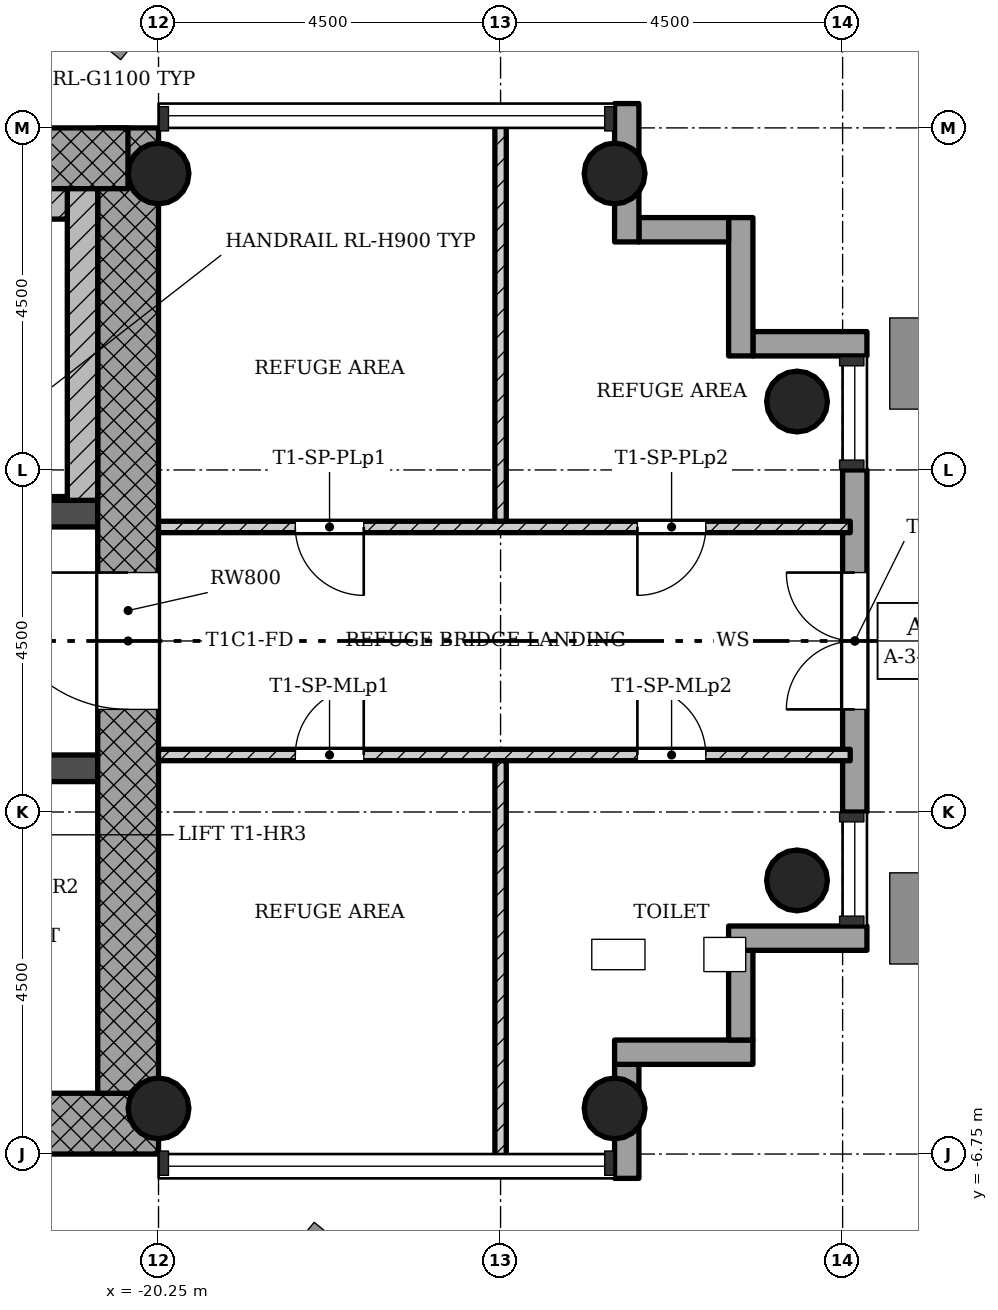
"""IFC4 building model, lengths in metres.
Left out: names, types, materials, properties, quantities, classifications, styles, units other than length and angle.
Written with IfcOpenShell. Run it as: python <this file> out.ifc"""

import sys

from ifc_helpers import new_model, si_unit, direction, frame, frame_2d, origin, origin_2d, place, context, subcontext, project, spatial, rectangle, hollow_circle, extrude, element, fill, save


model = new_model("IFC4")
c1 = context("Model", 3, precision=1e-05, world=origin(), true_north=direction((0.0, 1.0)))
c2 = subcontext(c1, "Body", "Model", "MODEL_VIEW")
j1 = project(units=[si_unit("LENGTHUNIT", "METRE"), si_unit("PLANEANGLEUNIT", "RADIAN")], contexts=[c1])
p1 = place(None, origin())
s1 = spatial("IfcSite", under=j1, at=p1, CompositionType="ELEMENT")
p2 = place(p1, origin())
s2 = spatial("IfcBuilding", under=s1, at=p2, CompositionType="ELEMENT")
p3 = place(p2, frame((0.0, 0.0, 181.3)))
s3 = spatial("IfcBuildingStorey", under=s2, at=p3, CompositionType="ELEMENT", Elevation=181.3)
p4 = place(p3, frame((-28.45, -6.35, 0.0), z_axis=(0.0, 0.0, 1.0), x_axis=(1.0, 0.0, 0.0)))
e1 = element("IfcWall", 1, at=p4, inside=s3, PredefinedType="SHEAR", context=c2, shape_type="SweptSolid", body=[
    extrude(rectangle(XDim=8.2, YDim=0.8, at=frame_2d((4.1, 0.0))), origin(), (0.0, 0.0, 1.0), 4.5),
])
p5 = place(p3, frame((-20.65, -5.95, 0.0), z_axis=(0.0, 0.0, 1.0), x_axis=(0.0, 1.0, 0.0)))
e2 = element("IfcWall", 2, at=p5, inside=s3, PredefinedType="SHEAR", context=c2, shape_type="SweptSolid", body=[
    extrude(rectangle(XDim=12.7, YDim=0.8, at=frame_2d((6.35, 0.0))), origin(), (0.0, 0.0, 1.0), 4.5),
])
p6 = place(p5, frame((5.05, 0.0, 0.0)))
e3 = element("IfcOpeningElement", 3, at=p6, cuts=e2, PredefinedType="OPENING", context=c2, shape_type="SweptSolid", body=[
    extrude(rectangle(XDim=1.8, YDim=2.1, at=frame_2d((0.9, 1.05))), frame((0.0, 0.41, 0.0), z_axis=(0.0, -1.0, 0.0), x_axis=(1.0, 0.0, 0.0)), (0.0, 0.0, 1.0), 0.82),
])
p7 = place(p3, frame((-20.652, 6.35, 0.0), z_axis=(0.0, 0.0, 1.0), x_axis=(-1.0, 0.0, 0.0)))
e4 = element("IfcWall", 4, at=p7, inside=s3, PredefinedType="SHEAR", context=c2, shape_type="SweptSolid", body=[
    extrude(rectangle(XDim=8.796, YDim=0.8, at=frame_2d((4.398, 0.0))), origin(), (0.0, 0.0, 1.0), 4.5),
])
p8 = place(p3, frame((-28.45, -1.675, 0.0), z_axis=(0.0, 0.0, 1.0), x_axis=(1.0, 0.0, 0.0)))
e5 = element("IfcWall", 5, at=p8, inside=s3, PredefinedType="SHEAR", context=c2, shape_type="SweptSolid", body=[
    extrude(rectangle(XDim=7.4, YDim=0.35, at=frame_2d((3.7, 0.0))), origin(), (0.0, 0.0, 1.0), 4.5),
])
p9 = place(p8, frame((0.95, 0.0, 0.0)))
e6 = element("IfcOpeningElement", 6, at=p9, cuts=e5, PredefinedType="OPENING", context=c2, shape_type="SweptSolid", body=[
    extrude(rectangle(XDim=1.1, YDim=2.1, at=frame_2d((0.55, 1.05))), frame((0.0, 0.185, 0.0), z_axis=(0.0, -1.0, 0.0), x_axis=(1.0, 0.0, 0.0)), (0.0, 0.0, 1.0), 0.37),
])
p10 = place(p8, frame((3.15, 0.0, 0.0)))
e7 = element("IfcOpeningElement", 7, at=p10, cuts=e5, PredefinedType="OPENING", context=c2, shape_type="SweptSolid", body=[
    extrude(rectangle(XDim=1.1, YDim=2.1, at=frame_2d((0.55, 1.05))), frame((0.0, 0.185, 0.0), z_axis=(0.0, -1.0, 0.0), x_axis=(1.0, 0.0, 0.0)), (0.0, 0.0, 1.0), 0.37),
])
p11 = place(p8, frame((5.35, 0.0, 0.0)))
e8 = element("IfcOpeningElement", 8, at=p11, cuts=e5, PredefinedType="OPENING", context=c2, shape_type="SweptSolid", body=[
    extrude(rectangle(XDim=1.1, YDim=2.1, at=frame_2d((0.55, 1.05))), frame((0.0, 0.185, 0.0), z_axis=(0.0, -1.0, 0.0), x_axis=(1.0, 0.0, 0.0)), (0.0, 0.0, 1.0), 0.37),
])
p12 = place(p3, frame((-28.45, 1.675, 0.0), z_axis=(0.0, 0.0, 1.0), x_axis=(1.0, 0.0, 0.0)))
e9 = element("IfcWall", 9, at=p12, inside=s3, PredefinedType="SHEAR", context=c2, shape_type="SweptSolid", body=[
    extrude(rectangle(XDim=7.4, YDim=0.35, at=frame_2d((3.7, 0.0))), origin(), (0.0, 0.0, 1.0), 4.5),
])
p13 = place(p12, frame((0.85, 0.0, 0.0)))
e10 = element("IfcOpeningElement", 10, at=p13, cuts=e9, PredefinedType="OPENING", context=c2, shape_type="SweptSolid", body=[
    extrude(rectangle(XDim=0.9, YDim=2.1, at=frame_2d((0.45, 1.05))), frame((0.0, 0.185, 0.0), z_axis=(0.0, -1.0, 0.0), x_axis=(1.0, 0.0, 0.0)), (0.0, 0.0, 1.0), 0.37),
])
for number, where, z_axis, x_axis in (
    (11, (-20.25, -6.15, 0.0), (0.0, 0.0, 1.0), (1.0, 0.0, 0.0)),
    (12, (-20.25, 6.15, 0.0), (0.0, 0.0, 1.0), (1.0, 0.0, 0.0)),
    (13, (-14.25, -6.15, 0.0), (0.0, 0.0, 1.0), (1.0, 0.0, 0.0)),
    (14, (-14.25, 6.15, 0.0), (0.0, 0.0, 1.0), (1.0, 0.0, 0.0)),
    (15, (-11.85, -3.15, 0.0), (0.0, 0.0, 1.0), (1.0, 0.0, 0.0)),
    (16, (-11.85, 3.15, 0.0), (0.0, 0.0, 1.0), (1.0, 0.0, 0.0)),
):
    element("IfcColumn", number, at=place(p3, frame(where, z_axis=z_axis, x_axis=x_axis)), inside=s3, PredefinedType="COLUMN", context=c2, shape_type="SweptSolid", body=[
        extrude(hollow_circle(Radius=0.4, WallThickness=0.028, at=origin_2d()), origin(), (0.0, 0.0, 1.0), 4.5),
    ])
p14 = place(p3, frame((-14.09, -7.07, -0.3), z_axis=(0.0, 0.0, 1.0), x_axis=(0.0, 1.0, 0.0)))
e17 = element("IfcWall", 17, at=p14, inside=s3, PredefinedType="STANDARD", context=c2, shape_type="SweptSolid", body=[
    extrude(rectangle(XDim=1.5, YDim=0.32, at=frame_2d((0.75, 0.0))), origin(), (0.0, 0.0, 1.0), 4.5),
])
p15 = place(p3, frame((-14.25, -5.41, -0.3), z_axis=(0.0, 0.0, 1.0), x_axis=(1.0, 0.0, 0.0)))
e18 = element("IfcWall", 18, at=p15, inside=s3, PredefinedType="STANDARD", context=c2, shape_type="SweptSolid", body=[
    extrude(rectangle(XDim=1.82, YDim=0.32, at=frame_2d((0.91, 0.0))), origin(), (0.0, 0.0, 1.0), 4.5),
])
p16 = place(p3, frame((-12.59, -5.25, -0.3), z_axis=(0.0, 0.0, 1.0), x_axis=(0.0, 1.0, 0.0)))
e19 = element("IfcWall", 19, at=p16, inside=s3, PredefinedType="STANDARD", context=c2, shape_type="SweptSolid", body=[
    extrude(rectangle(XDim=1.18, YDim=0.32, at=frame_2d((0.59, 0.0))), origin(), (0.0, 0.0, 1.0), 4.5),
])
p17 = place(p3, frame((-12.75, -3.91, -0.3), z_axis=(0.0, 0.0, 1.0), x_axis=(1.0, 0.0, 0.0)))
e20 = element("IfcWall", 20, at=p17, inside=s3, PredefinedType="STANDARD", context=c2, shape_type="SweptSolid", body=[
    extrude(rectangle(XDim=1.82, YDim=0.32, at=frame_2d((0.91, 0.0))), origin(), (0.0, 0.0, 1.0), 4.5),
])
p18 = place(p3, frame((-11.09, -2.25, -0.12), z_axis=(0.0, 0.0, 1.0), x_axis=(0.0, 1.0, 0.0)))
e21 = element("IfcWall", 21, at=p18, inside=s3, PredefinedType="STANDARD", context=c2, shape_type="SweptSolid", body=[
    extrude(rectangle(XDim=4.5, YDim=0.32, at=frame_2d((2.25, 0.0))), origin(), (0.0, 0.0, 1.0), 4.32),
])
p19 = place(p18, frame((1.35, 0.0, 0.0)))
e22 = element("IfcOpeningElement", 22, at=p19, cuts=e21, PredefinedType="OPENING", context=c2, shape_type="SweptSolid", body=[
    extrude(rectangle(XDim=1.8, YDim=2.1, at=frame_2d((0.9, 1.05))), frame((0.0, 0.17, 0.0), z_axis=(0.0, -1.0, 0.0), x_axis=(1.0, 0.0, 0.0)), (0.0, 0.0, 1.0), 0.34),
])
p20 = place(p3, frame((-10.93, 3.91, -0.3), z_axis=(0.0, 0.0, 1.0), x_axis=(-1.0, 0.0, 0.0)))
e23 = element("IfcWall", 23, at=p20, inside=s3, PredefinedType="STANDARD", context=c2, shape_type="SweptSolid", body=[
    extrude(rectangle(XDim=1.5, YDim=0.32, at=frame_2d((0.75, 0.0))), origin(), (0.0, 0.0, 1.0), 4.5),
])
p21 = place(p3, frame((-12.59, 3.75, -0.3), z_axis=(0.0, 0.0, 1.0), x_axis=(0.0, 1.0, 0.0)))
e24 = element("IfcWall", 24, at=p21, inside=s3, PredefinedType="STANDARD", context=c2, shape_type="SweptSolid", body=[
    extrude(rectangle(XDim=1.82, YDim=0.32, at=frame_2d((0.91, 0.0))), origin(), (0.0, 0.0, 1.0), 4.5),
])
p22 = place(p3, frame((-12.75, 5.41, -0.3), z_axis=(0.0, 0.0, 1.0), x_axis=(-1.0, 0.0, 0.0)))
e25 = element("IfcWall", 25, at=p22, inside=s3, PredefinedType="STANDARD", context=c2, shape_type="SweptSolid", body=[
    extrude(rectangle(XDim=1.18, YDim=0.32, at=frame_2d((0.59, 0.0))), origin(), (0.0, 0.0, 1.0), 4.5),
])
p23 = place(p3, frame((-14.09, 5.25, -0.3), z_axis=(0.0, 0.0, 1.0), x_axis=(0.0, 1.0, 0.0)))
e26 = element("IfcWall", 26, at=p23, inside=s3, PredefinedType="STANDARD", context=c2, shape_type="SweptSolid", body=[
    extrude(rectangle(XDim=1.82, YDim=0.32, at=frame_2d((0.91, 0.0))), origin(), (0.0, 0.0, 1.0), 4.5),
])
p24 = place(p3, frame((-20.25, 1.5, 0.0), z_axis=(0.0, 0.0, 1.0), x_axis=(1.0, 0.0, 0.0)))
e27 = element("IfcWall", 27, at=p24, inside=s3, PredefinedType="PARTITIONING", context=c2, shape_type="SweptSolid", body=[
    extrude(rectangle(XDim=9.1, YDim=0.15, at=frame_2d((4.55, 0.0))), origin(), (0.0, 0.0, 1.0), 4.08),
])
p25 = place(p24, frame((1.8, 0.0, 0.0)))
e28 = element("IfcOpeningElement", 28, at=p25, cuts=e27, PredefinedType="OPENING", context=c2, shape_type="SweptSolid", body=[
    extrude(rectangle(XDim=0.9, YDim=2.1, at=frame_2d((0.45, 1.05))), frame((0.0, 0.085, 0.0), z_axis=(0.0, -1.0, 0.0), x_axis=(1.0, 0.0, 0.0)), (0.0, 0.0, 1.0), 0.17),
])
p26 = place(p24, frame((6.3, 0.0, 0.0)))
e29 = element("IfcOpeningElement", 29, at=p26, cuts=e27, PredefinedType="OPENING", context=c2, shape_type="SweptSolid", body=[
    extrude(rectangle(XDim=0.9, YDim=2.1, at=frame_2d((0.45, 1.05))), frame((0.0, 0.085, 0.0), z_axis=(0.0, -1.0, 0.0), x_axis=(1.0, 0.0, 0.0)), (0.0, 0.0, 1.0), 0.17),
])
p27 = place(p3, frame((-15.75, 1.575, 0.0), z_axis=(0.0, 0.0, 1.0), x_axis=(0.0, 1.0, 0.0)))
e30 = element("IfcWall", 30, at=p27, inside=s3, PredefinedType="PARTITIONING", context=c2, shape_type="SweptSolid", body=[
    extrude(rectangle(XDim=5.275, YDim=0.15, at=frame_2d((2.638, 0.0))), origin(), (0.0, 0.0, 1.0), 4.08),
])
p28 = place(p3, frame((-20.25, -1.5, 0.0), z_axis=(0.0, 0.0, 1.0), x_axis=(1.0, 0.0, 0.0)))
e31 = element("IfcWall", 31, at=p28, inside=s3, PredefinedType="PARTITIONING", context=c2, shape_type="SweptSolid", body=[
    extrude(rectangle(XDim=9.1, YDim=0.15, at=frame_2d((4.55, 0.0))), origin(), (0.0, 0.0, 1.0), 4.08),
])
p29 = place(p28, frame((1.8, 0.0, 0.0)))
e32 = element("IfcOpeningElement", 32, at=p29, cuts=e31, PredefinedType="OPENING", context=c2, shape_type="SweptSolid", body=[
    extrude(rectangle(XDim=0.9, YDim=2.1, at=frame_2d((0.45, 1.05))), frame((0.0, 0.085, 0.0), z_axis=(0.0, -1.0, 0.0), x_axis=(1.0, 0.0, 0.0)), (0.0, 0.0, 1.0), 0.17),
])
p30 = place(p28, frame((6.3, 0.0, 0.0)))
e33 = element("IfcOpeningElement", 33, at=p30, cuts=e31, PredefinedType="OPENING", context=c2, shape_type="SweptSolid", body=[
    extrude(rectangle(XDim=0.9, YDim=2.1, at=frame_2d((0.45, 1.05))), frame((0.0, 0.085, 0.0), z_axis=(0.0, -1.0, 0.0), x_axis=(1.0, 0.0, 0.0)), (0.0, 0.0, 1.0), 0.17),
])
p31 = place(p3, frame((-15.75, -1.575, 0.0), z_axis=(0.0, 0.0, 1.0), x_axis=(0.0, -1.0, 0.0)))
e34 = element("IfcWall", 34, at=p31, inside=s3, PredefinedType="PARTITIONING", context=c2, shape_type="SweptSolid", body=[
    extrude(rectangle(XDim=5.275, YDim=0.15, at=frame_2d((2.638, 0.0))), origin(), (0.0, 0.0, 1.0), 4.08),
])
p32 = place(p3, frame((-21.25, 1.85, 0.0), z_axis=(0.0, 0.0, 1.0), x_axis=(0.0, 1.0, 0.0)))
e35 = element("IfcWall", 35, at=p32, inside=s3, PredefinedType="SHEAR", context=c2, shape_type="SweptSolid", body=[
    extrude(rectangle(XDim=4.1, YDim=0.4, at=frame_2d((2.05, 0.0))), origin(), (0.0, 0.0, 1.0), 4.5),
])
p33 = place(p3, frame((-28.05, 5.75, 0.0), z_axis=(0.0, 0.0, 1.0), x_axis=(1.0, 0.0, 0.0)))
e36 = element("IfcWall", 36, at=p33, inside=s3, PredefinedType="SHEAR", context=c2, shape_type="SweptSolid", body=[
    extrude(rectangle(XDim=6.6, YDim=0.4, at=frame_2d((3.3, 0.0))), origin(), (0.0, 0.0, 1.0), 4.5),
])
p34 = place(p3, frame((-26.65, 1.875, 0.0), z_axis=(0.0, 0.0, 1.0), x_axis=(1.0, 0.0, 0.0)))
e37 = element("IfcWall", 37, at=p34, inside=s3, PredefinedType="SHEAR", context=c2, shape_type="SweptSolid", body=[
    extrude(rectangle(XDim=5.2, YDim=0.05, at=frame_2d((2.6, 0.0))), origin(), (0.0, 0.0, 1.0), 4.5),
])
p35 = place(p19, origin())
e38 = element("IfcDoor", 38, at=p35, inside=s3, OperationType="DOUBLE_DOOR_SINGLE_SWING", PredefinedType="DOOR", context=c2, shape_type="SweptSolid", body=[
    extrude(rectangle(XDim=1.8, YDim=2.1, at=frame_2d((0.9, 1.05))), frame((0.0, 0.025, 0.0), z_axis=(0.0, -1.0, 0.0), x_axis=(1.0, 0.0, 0.0)), (0.0, 0.0, 1.0), 0.05),
])
fill(e22, e38)
p36 = place(p25, origin())
e39 = element("IfcDoor", 39, at=p36, inside=s3, OperationType="SINGLE_SWING_RIGHT", PredefinedType="DOOR", context=c2, shape_type="SweptSolid", body=[
    extrude(rectangle(XDim=0.9, YDim=2.1, at=frame_2d((0.45, 1.05))), frame((0.0, 0.025, 0.0), z_axis=(0.0, -1.0, 0.0), x_axis=(1.0, 0.0, 0.0)), (0.0, 0.0, 1.0), 0.05),
])
fill(e28, e39)
p37 = place(p26, origin())
e40 = element("IfcDoor", 40, at=p37, inside=s3, OperationType="SINGLE_SWING_LEFT", PredefinedType="DOOR", context=c2, shape_type="SweptSolid", body=[
    extrude(rectangle(XDim=0.9, YDim=2.1, at=frame_2d((0.45, 1.05))), frame((0.0, 0.025, 0.0), z_axis=(0.0, -1.0, 0.0), x_axis=(1.0, 0.0, 0.0)), (0.0, 0.0, 1.0), 0.05),
])
fill(e29, e40)
p38 = place(p29, origin())
e41 = element("IfcDoor", 41, at=p38, inside=s3, OperationType="SINGLE_SWING_LEFT", PredefinedType="DOOR", context=c2, shape_type="SweptSolid", body=[
    extrude(rectangle(XDim=0.9, YDim=2.1, at=frame_2d((0.45, 1.05))), frame((0.0, 0.025, 0.0), z_axis=(0.0, -1.0, 0.0), x_axis=(1.0, 0.0, 0.0)), (0.0, 0.0, 1.0), 0.05),
])
fill(e32, e41)
p39 = place(p30, origin())
e42 = element("IfcDoor", 42, at=p39, inside=s3, OperationType="SINGLE_SWING_RIGHT", PredefinedType="DOOR", context=c2, shape_type="SweptSolid", body=[
    extrude(rectangle(XDim=0.9, YDim=2.1, at=frame_2d((0.45, 1.05))), frame((0.0, 0.025, 0.0), z_axis=(0.0, -1.0, 0.0), x_axis=(1.0, 0.0, 0.0)), (0.0, 0.0, 1.0), 0.05),
])
fill(e33, e42)
p40 = place(p6, origin())
e43 = element("IfcDoor", 43, at=p40, inside=s3, OperationType="SINGLE_SWING_LEFT", PredefinedType="DOOR", context=c2, shape_type="SweptSolid", body=[
    extrude(rectangle(XDim=1.8, YDim=2.1, at=frame_2d((0.9, 1.05))), frame((0.0, 0.025, 0.0), z_axis=(0.0, -1.0, 0.0), x_axis=(1.0, 0.0, 0.0)), (0.0, 0.0, 1.0), 0.05),
])
fill(e3, e43)
save(model, sys.argv[1])
